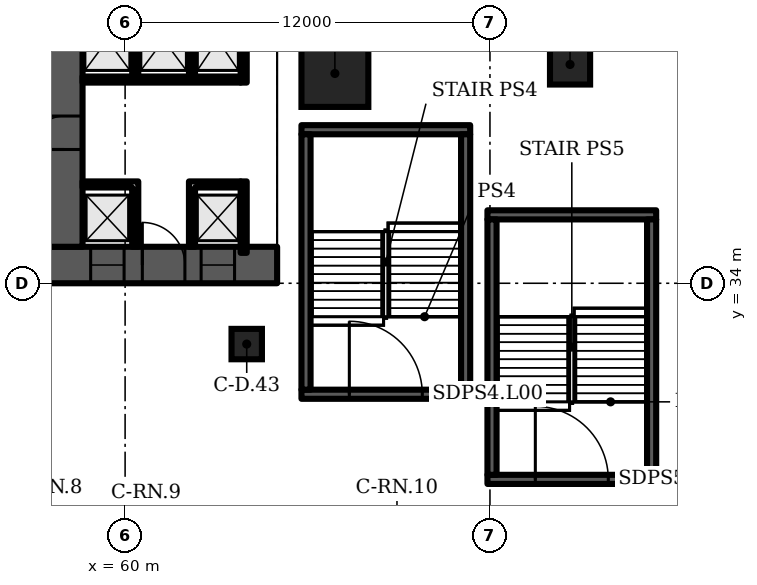
"""IFC4 building model, lengths in metres.
Left out: names, types, materials, properties, quantities, classifications, styles, units other than length and angle.
Written with IfcOpenShell. Run it as: python <this file> out.ifc"""

import sys

from ifc_helpers import new_model, si_unit, direction, frame, frame_2d, origin, origin_2d, place, context, subcontext, project, spatial, polyline, rectangle, outline, extrude, element, fill, save


model = new_model("IFC4")
c1 = context("Model", 3, precision=1e-05, world=origin(), true_north=direction((0.0, 1.0)))
c2 = subcontext(c1, "Body", "Model", "MODEL_VIEW")
j1 = project(units=[si_unit("LENGTHUNIT", "METRE"), si_unit("PLANEANGLEUNIT", "RADIAN")], contexts=[c1])
p1 = place(None, origin())
s1 = spatial("IfcSite", under=j1, at=p1, CompositionType="ELEMENT")
p2 = place(p1, origin())
s2 = spatial("IfcBuilding", under=s1, at=p2, CompositionType="ELEMENT")
p3 = place(p2, origin())
s3 = spatial("IfcBuildingStorey", under=s2, at=p3, CompositionType="ELEMENT", Elevation=0.0)
p4 = place(p3, frame((66.9, 40.9, 0.0), z_axis=(0.0, 0.0, 1.0), x_axis=(1.0, 0.0, 0.0)))
e1 = element("IfcColumn", 1, at=p4, inside=s3, PredefinedType="COLUMN", context=c2, shape_type="SweptSolid", body=[
    extrude(rectangle(XDim=2.2, YDim=2.2, at=origin_2d()), origin(), (0.0, 0.0, 1.0), 8.0),
])
p5 = place(p3, frame((74.634, 41.196, 0.0), z_axis=(0.0, 0.0, 1.0), x_axis=(1.0, 0.0, 0.0)))
e2 = element("IfcColumn", 2, at=p5, inside=s3, PredefinedType="COLUMN", context=c2, shape_type="SweptSolid", body=[
    extrude(rectangle(XDim=1.32, YDim=1.32, at=origin_2d()), origin(), (0.0, 0.0, 1.0), 8.0),
])
p6 = place(p3, frame((64.0, 32.0, 0.0), z_axis=(0.0, 0.0, 1.0), x_axis=(1.0, 0.0, 0.0)))
e3 = element("IfcColumn", 3, at=p6, inside=s3, PredefinedType="COLUMN", context=c2, shape_type="SweptSolid", body=[
    extrude(rectangle(XDim=1.0, YDim=1.0, at=origin_2d()), origin(), (0.0, 0.0, 1.0), 8.0),
])
p7 = place(p3, frame((9.0, 34.6, 0.0), z_axis=(0.0, 0.0, 1.0), x_axis=(1.0, 0.0, 0.0)))
e4 = element("IfcWall", 4, at=p7, inside=s3, PredefinedType="SHEAR", context=c2, shape_type="SweptSolid", body=[
    extrude(rectangle(XDim=56.0, YDim=1.2, at=frame_2d((28.0, 0.0))), origin(), (0.0, 0.0, 1.0), 7.7),
])
p8 = place(p7, frame((3.3, 0.0, 0.0)))
e5 = element("IfcOpeningElement", 5, at=p8, cuts=e4, PredefinedType="OPENING", context=c2, shape_type="SweptSolid", body=[
    extrude(rectangle(XDim=1.0, YDim=2.1, at=frame_2d((0.5, 1.05))), frame((0.0, 0.61, 0.0), z_axis=(0.0, -1.0, 0.0), x_axis=(1.0, 0.0, 0.0)), (0.0, 0.0, 1.0), 1.22),
])
p9 = place(p7, frame((7.867, 0.0, 0.0)))
e6 = element("IfcOpeningElement", 6, at=p9, cuts=e4, PredefinedType="OPENING", context=c2, shape_type="SweptSolid", body=[
    extrude(rectangle(XDim=1.1, YDim=2.1, at=frame_2d((0.55, 1.05))), frame((0.0, 0.61, 0.0), z_axis=(0.0, -1.0, 0.0), x_axis=(1.0, 0.0, 0.0)), (0.0, 0.0, 1.0), 1.22),
])
p10 = place(p7, frame((12.033, 0.0, 0.0)))
e7 = element("IfcOpeningElement", 7, at=p10, cuts=e4, PredefinedType="OPENING", context=c2, shape_type="SweptSolid", body=[
    extrude(rectangle(XDim=1.1, YDim=2.1, at=frame_2d((0.55, 1.05))), frame((0.0, 0.61, 0.0), z_axis=(0.0, -1.0, 0.0), x_axis=(1.0, 0.0, 0.0)), (0.0, 0.0, 1.0), 1.22),
])
p11 = place(p7, frame((9.8, 0.0, 0.0)))
e8 = element("IfcOpeningElement", 8, at=p11, cuts=e4, PredefinedType="OPENING", context=c2, shape_type="SweptSolid", body=[
    extrude(rectangle(XDim=1.4, YDim=2.1, at=frame_2d((0.7, 1.05))), frame((0.0, 0.61, 0.0), z_axis=(0.0, -1.0, 0.0), x_axis=(1.0, 0.0, 0.0)), (0.0, 0.0, 1.0), 1.22),
])
p12 = place(p7, frame((14.65, 0.0, 0.0)))
e9 = element("IfcOpeningElement", 9, at=p12, cuts=e4, PredefinedType="OPENING", context=c2, shape_type="SweptSolid", body=[
    extrude(rectangle(XDim=1.2, YDim=2.1, at=frame_2d((0.6, 1.05))), frame((0.0, 0.61, 0.0), z_axis=(0.0, -1.0, 0.0), x_axis=(1.0, 0.0, 0.0)), (0.0, 0.0, 1.0), 1.22),
])
p13 = place(p7, frame((21.867, 0.0, 0.0)))
e10 = element("IfcOpeningElement", 10, at=p13, cuts=e4, PredefinedType="OPENING", context=c2, shape_type="SweptSolid", body=[
    extrude(rectangle(XDim=1.1, YDim=2.1, at=frame_2d((0.55, 1.05))), frame((0.0, 0.61, 0.0), z_axis=(0.0, -1.0, 0.0), x_axis=(1.0, 0.0, 0.0)), (0.0, 0.0, 1.0), 1.22),
])
p14 = place(p7, frame((26.033, 0.0, 0.0)))
e11 = element("IfcOpeningElement", 11, at=p14, cuts=e4, PredefinedType="OPENING", context=c2, shape_type="SweptSolid", body=[
    extrude(rectangle(XDim=1.1, YDim=2.1, at=frame_2d((0.55, 1.05))), frame((0.0, 0.61, 0.0), z_axis=(0.0, -1.0, 0.0), x_axis=(1.0, 0.0, 0.0)), (0.0, 0.0, 1.0), 1.22),
])
p15 = place(p7, frame((23.8, 0.0, 0.0)))
e12 = element("IfcOpeningElement", 12, at=p15, cuts=e4, PredefinedType="OPENING", context=c2, shape_type="SweptSolid", body=[
    extrude(rectangle(XDim=1.4, YDim=2.1, at=frame_2d((0.7, 1.05))), frame((0.0, 0.61, 0.0), z_axis=(0.0, -1.0, 0.0), x_axis=(1.0, 0.0, 0.0)), (0.0, 0.0, 1.0), 1.22),
])
p16 = place(p7, frame((28.867, 0.0, 0.0)))
e13 = element("IfcOpeningElement", 13, at=p16, cuts=e4, PredefinedType="OPENING", context=c2, shape_type="SweptSolid", body=[
    extrude(rectangle(XDim=1.1, YDim=2.1, at=frame_2d((0.55, 1.05))), frame((0.0, 0.61, 0.0), z_axis=(0.0, -1.0, 0.0), x_axis=(1.0, 0.0, 0.0)), (0.0, 0.0, 1.0), 1.22),
])
p17 = place(p7, frame((33.033, 0.0, 0.0)))
e14 = element("IfcOpeningElement", 14, at=p17, cuts=e4, PredefinedType="OPENING", context=c2, shape_type="SweptSolid", body=[
    extrude(rectangle(XDim=1.1, YDim=2.1, at=frame_2d((0.55, 1.05))), frame((0.0, 0.61, 0.0), z_axis=(0.0, -1.0, 0.0), x_axis=(1.0, 0.0, 0.0)), (0.0, 0.0, 1.0), 1.22),
])
p18 = place(p7, frame((40.15, 0.0, 0.0)))
e15 = element("IfcOpeningElement", 15, at=p18, cuts=e4, PredefinedType="OPENING", context=c2, shape_type="SweptSolid", body=[
    extrude(rectangle(XDim=1.2, YDim=2.1, at=frame_2d((0.6, 1.05))), frame((0.0, 0.61, 0.0), z_axis=(0.0, -1.0, 0.0), x_axis=(1.0, 0.0, 0.0)), (0.0, 0.0, 1.0), 1.22),
])
p19 = place(p7, frame((42.867, 0.0, 0.0)))
e16 = element("IfcOpeningElement", 16, at=p19, cuts=e4, PredefinedType="OPENING", context=c2, shape_type="SweptSolid", body=[
    extrude(rectangle(XDim=1.1, YDim=2.1, at=frame_2d((0.55, 1.05))), frame((0.0, 0.61, 0.0), z_axis=(0.0, -1.0, 0.0), x_axis=(1.0, 0.0, 0.0)), (0.0, 0.0, 1.0), 1.22),
])
p20 = place(p7, frame((47.033, 0.0, 0.0)))
e17 = element("IfcOpeningElement", 17, at=p20, cuts=e4, PredefinedType="OPENING", context=c2, shape_type="SweptSolid", body=[
    extrude(rectangle(XDim=1.1, YDim=2.1, at=frame_2d((0.55, 1.05))), frame((0.0, 0.61, 0.0), z_axis=(0.0, -1.0, 0.0), x_axis=(1.0, 0.0, 0.0)), (0.0, 0.0, 1.0), 1.22),
])
p21 = place(p7, frame((44.8, 0.0, 0.0)))
e18 = element("IfcOpeningElement", 18, at=p21, cuts=e4, PredefinedType="OPENING", context=c2, shape_type="SweptSolid", body=[
    extrude(rectangle(XDim=1.4, YDim=2.1, at=frame_2d((0.7, 1.05))), frame((0.0, 0.61, 0.0), z_axis=(0.0, -1.0, 0.0), x_axis=(1.0, 0.0, 0.0)), (0.0, 0.0, 1.0), 1.22),
])
p22 = place(p7, frame((49.867, 0.0, 0.0)))
e19 = element("IfcOpeningElement", 19, at=p22, cuts=e4, PredefinedType="OPENING", context=c2, shape_type="SweptSolid", body=[
    extrude(rectangle(XDim=1.1, YDim=2.1, at=frame_2d((0.55, 1.05))), frame((0.0, 0.61, 0.0), z_axis=(0.0, -1.0, 0.0), x_axis=(1.0, 0.0, 0.0)), (0.0, 0.0, 1.0), 1.22),
])
p23 = place(p7, frame((53.5, 0.0, 0.0)))
e20 = element("IfcOpeningElement", 20, at=p23, cuts=e4, PredefinedType="OPENING", context=c2, shape_type="SweptSolid", body=[
    extrude(rectangle(XDim=1.1, YDim=2.1, at=frame_2d((0.55, 1.05))), frame((0.0, 0.61, 0.0), z_axis=(0.0, -1.0, 0.0), x_axis=(1.0, 0.0, 0.0)), (0.0, 0.0, 1.0), 1.22),
])
p24 = place(p7, frame((51.567, 0.0, 0.0)))
e21 = element("IfcOpeningElement", 21, at=p24, cuts=e4, PredefinedType="OPENING", context=c2, shape_type="SweptSolid", body=[
    extrude(rectangle(XDim=1.4, YDim=2.1, at=frame_2d((0.7, 1.05))), frame((0.0, 0.61, 0.0), z_axis=(0.0, -1.0, 0.0), x_axis=(1.0, 0.0, 0.0)), (0.0, 0.0, 1.0), 1.22),
])
p25 = place(p3, frame((58.0, 35.2, 0.0), z_axis=(0.0, 0.0, 1.0), x_axis=(0.0, 1.0, 0.0)))
e22 = element("IfcWall", 22, at=p25, inside=s3, PredefinedType="SHEAR", context=c2, shape_type="SweptSolid", body=[
    extrude(rectangle(XDim=12.8, YDim=1.2, at=frame_2d((6.4, 0.0))), origin(), (0.0, 0.0, 1.0), 7.7),
])
p26 = place(p25, frame((10.134, 0.0, 0.0)))
e23 = element("IfcOpeningElement", 23, at=p26, cuts=e22, PredefinedType="OPENING", context=c2, shape_type="SweptSolid", body=[
    extrude(rectangle(XDim=1.0, YDim=2.1, at=frame_2d((0.5, 1.05))), frame((0.0, 0.61, 0.0), z_axis=(0.0, -1.0, 0.0), x_axis=(1.0, 0.0, 0.0)), (0.0, 0.0, 1.0), 1.22),
])
p27 = place(p25, frame((3.2, 0.0, 0.0)))
e24 = element("IfcOpeningElement", 24, at=p27, cuts=e22, PredefinedType="OPENING", context=c2, shape_type="SweptSolid", body=[
    extrude(rectangle(XDim=1.1, YDim=2.1, at=frame_2d((0.55, 1.05))), frame((0.0, 0.61, 0.0), z_axis=(0.0, -1.0, 0.0), x_axis=(1.0, 0.0, 0.0)), (0.0, 0.0, 1.0), 1.22),
])
p28 = place(p3, frame((58.6, 40.7, 0.0), z_axis=(0.0, 0.0, 1.0), x_axis=(1.0, 0.0, 0.0)))
e25 = element("IfcWall", 25, at=p28, inside=s3, PredefinedType="PARTITIONING", context=c2, shape_type="SweptSolid", body=[
    extrude(rectangle(XDim=5.2, YDim=0.2, at=frame_2d((2.6, 0.0))), origin(), (0.0, 0.0, 1.0), 7.7),
])
p29 = place(p28, frame((0.267, 0.0, 0.0)))
e26 = element("IfcOpeningElement", 26, at=p29, cuts=e25, PredefinedType="OPENING", context=c2, shape_type="SweptSolid", body=[
    extrude(rectangle(XDim=1.1, YDim=2.1, at=frame_2d((0.55, 1.05))), frame((0.0, 0.11, 0.0), z_axis=(0.0, -1.0, 0.0), x_axis=(1.0, 0.0, 0.0)), (0.0, 0.0, 1.0), 0.22),
])
p30 = place(p28, frame((2.117, 0.0, 0.0)))
e27 = element("IfcOpeningElement", 27, at=p30, cuts=e25, PredefinedType="OPENING", context=c2, shape_type="SweptSolid", body=[
    extrude(rectangle(XDim=1.1, YDim=2.1, at=frame_2d((0.55, 1.05))), frame((0.0, 0.11, 0.0), z_axis=(0.0, -1.0, 0.0), x_axis=(1.0, 0.0, 0.0)), (0.0, 0.0, 1.0), 0.22),
])
p31 = place(p28, frame((3.9, 0.0, 0.0)))
e28 = element("IfcOpeningElement", 28, at=p31, cuts=e25, PredefinedType="OPENING", context=c2, shape_type="SweptSolid", body=[
    extrude(rectangle(XDim=1.1, YDim=2.1, at=frame_2d((0.55, 1.05))), frame((0.0, 0.11, 0.0), z_axis=(0.0, -1.0, 0.0), x_axis=(1.0, 0.0, 0.0)), (0.0, 0.0, 1.0), 0.22),
])
p32 = place(p3, frame((0.0, 0.0, -0.0)))
e29 = element("IfcWall", 29, at=p32, inside=s3, PredefinedType="PARTITIONING", context=c2, shape_type="SweptSolid", body=[
    extrude(outline(polyline([(60.233, 37.15), (58.6, 37.15), (58.6, 37.35), (60.233, 37.35), (60.433, 37.35), (60.433, 35.2), (60.233, 35.2), (60.233, 37.15)])), origin(), (0.0, 0.0, 1.0), 7.7),
])
p33 = place(p3, frame((0.0, 0.0, -0.0)))
e30 = element("IfcWall", 30, at=p33, inside=s3, PredefinedType="PARTITIONING", context=c2, shape_type="SweptSolid", body=[
    extrude(outline(polyline([(62.1, 37.35), (62.3, 37.35), (63.8, 37.35), (63.8, 37.15), (62.3, 37.15), (62.3, 35.2), (62.1, 35.2), (62.1, 37.35)])), origin(), (0.0, 0.0, 1.0), 7.7),
])
p34 = place(p3, frame((0.0, 0.0, -0.0)))
e31 = element("IfcWall", 31, at=p34, inside=s3, PredefinedType="PARTITIONING", context=c2, shape_type="SweptSolid", body=[
    extrude(outline(polyline([(60.433, 40.8), (60.233, 40.8), (60.233, 43.8), (58.6, 43.8), (58.6, 44.0), (63.8, 44.0), (63.8, 43.8), (62.3, 43.8), (62.3, 40.8), (62.1, 40.8), (62.1, 43.8), (60.433, 43.8), (60.433, 40.8)])), origin(), (0.0, 0.0, 1.0), 7.7),
])
p35 = place(p3, frame((63.9, 35.0, 0.0), z_axis=(0.0, 0.0, 1.0), x_axis=(0.0, 1.0, 0.0)))
e32 = element("IfcWall", 32, at=p35, inside=s3, PredefinedType="PARTITIONING", context=c2, shape_type="SweptSolid", body=[
    extrude(rectangle(XDim=2.35, YDim=0.2, at=frame_2d((1.175, 0.0))), origin(), (0.0, 0.0, 1.0), 7.7),
])
p36 = place(p3, frame((63.9, 40.6, 0.0), z_axis=(0.0, 0.0, 1.0), x_axis=(0.0, 1.0, 0.0)))
e33 = element("IfcWall", 33, at=p36, inside=s3, PredefinedType="PARTITIONING", context=c2, shape_type="SweptSolid", body=[
    extrude(rectangle(XDim=3.4, YDim=0.2, at=frame_2d((1.7, 0.0))), origin(), (0.0, 0.0, 1.0), 7.7),
])
p37 = place(p3, frame((65.8, 30.35, 0.0), z_axis=(0.0, 0.0, 1.0), x_axis=(1.0, 0.0, 0.0)))
e34 = element("IfcWall", 34, at=p37, inside=s3, PredefinedType="SHEAR", context=c2, shape_type="SweptSolid", body=[
    extrude(rectangle(XDim=5.55, YDim=0.3, at=frame_2d((2.775, 0.0))), origin(), (0.0, 0.0, 1.0), 7.7),
])
p38 = place(p37, frame((1.575, 0.0, 0.0)))
e35 = element("IfcOpeningElement", 35, at=p38, cuts=e34, PredefinedType="OPENING", context=c2, shape_type="SweptSolid", body=[
    extrude(rectangle(XDim=2.4, YDim=2.1, at=frame_2d((1.2, 1.05))), frame((0.0, 0.16, 0.0), z_axis=(0.0, -1.0, 0.0), x_axis=(1.0, 0.0, 0.0)), (0.0, 0.0, 1.0), 0.32),
])
p39 = place(p3, frame((65.8, 39.05, 0.0), z_axis=(0.0, 0.0, 1.0), x_axis=(1.0, 0.0, 0.0)))
e36 = element("IfcWall", 36, at=p39, inside=s3, PredefinedType="SHEAR", context=c2, shape_type="SweptSolid", body=[
    extrude(rectangle(XDim=5.55, YDim=0.3, at=frame_2d((2.775, 0.0))), origin(), (0.0, 0.0, 1.0), 7.7),
])
for number, where, z_axis, x_axis in (
    (37, (65.95, 30.5, 0.0), (0.0, 0.0, 1.0), (0.0, 1.0, 0.0)),
    (38, (71.2, 30.5, 0.0), (0.0, 0.0, 1.0), (0.0, 1.0, 0.0)),
):
    element("IfcWall", number, at=place(p3, frame(where, z_axis=z_axis, x_axis=x_axis)), inside=s3, PredefinedType="SHEAR", context=c2, shape_type="SweptSolid", body=[
        extrude(rectangle(XDim=8.4, YDim=0.3, at=frame_2d((4.2, 0.0))), origin(), (0.0, 0.0, 1.0), 7.7),
    ])
p40 = place(p3, frame((71.917, 27.55, 0.0), z_axis=(0.0, 0.0, 1.0), x_axis=(1.0, 0.0, 0.0)))
e39 = element("IfcWall", 39, at=p40, inside=s3, PredefinedType="SHEAR", context=c2, shape_type="SweptSolid", body=[
    extrude(rectangle(XDim=5.55, YDim=0.3, at=frame_2d((2.775, 0.0))), origin(), (0.0, 0.0, 1.0), 7.7),
])
p41 = place(p40, frame((1.575, 0.0, 0.0)))
e40 = element("IfcOpeningElement", 40, at=p41, cuts=e39, PredefinedType="OPENING", context=c2, shape_type="SweptSolid", body=[
    extrude(rectangle(XDim=2.4, YDim=2.1, at=frame_2d((1.2, 1.05))), frame((0.0, 0.16, 0.0), z_axis=(0.0, -1.0, 0.0), x_axis=(1.0, 0.0, 0.0)), (0.0, 0.0, 1.0), 0.32),
])
p42 = place(p3, frame((71.917, 36.25, 0.0), z_axis=(0.0, 0.0, 1.0), x_axis=(1.0, 0.0, 0.0)))
e41 = element("IfcWall", 41, at=p42, inside=s3, PredefinedType="SHEAR", context=c2, shape_type="SweptSolid", body=[
    extrude(rectangle(XDim=5.55, YDim=0.3, at=frame_2d((2.775, 0.0))), origin(), (0.0, 0.0, 1.0), 7.7),
])
for number, where, z_axis, x_axis in (
    (42, (72.067, 27.7, 0.0), (0.0, 0.0, 1.0), (0.0, 1.0, 0.0)),
    (43, (77.317, 27.7, 0.0), (0.0, 0.0, 1.0), (0.0, 1.0, 0.0)),
):
    element("IfcWall", number, at=place(p3, frame(where, z_axis=z_axis, x_axis=x_axis)), inside=s3, PredefinedType="SHEAR", context=c2, shape_type="SweptSolid", body=[
        extrude(rectangle(XDim=8.4, YDim=0.3, at=frame_2d((4.2, 0.0))), origin(), (0.0, 0.0, 1.0), 7.7),
    ])
p43 = place(p22, origin())
e44 = element("IfcDoor", 44, at=p43, inside=s3, OperationType="DOUBLE_DOOR_SLIDING", PredefinedType="DOOR", context=c2, shape_type="SweptSolid", body=[
    extrude(rectangle(XDim=1.1, YDim=2.1, at=frame_2d((0.55, 1.05))), frame((0.0, 0.025, 0.0), z_axis=(0.0, -1.0, 0.0), x_axis=(1.0, 0.0, 0.0)), (0.0, 0.0, 1.0), 0.05),
])
fill(e19, e44)
p44 = place(p23, origin())
e45 = element("IfcDoor", 45, at=p44, inside=s3, OperationType="DOUBLE_DOOR_SLIDING", PredefinedType="DOOR", context=c2, shape_type="SweptSolid", body=[
    extrude(rectangle(XDim=1.1, YDim=2.1, at=frame_2d((0.55, 1.05))), frame((0.0, 0.025, 0.0), z_axis=(0.0, -1.0, 0.0), x_axis=(1.0, 0.0, 0.0)), (0.0, 0.0, 1.0), 0.05),
])
fill(e20, e45)
p45 = place(p24, origin())
e46 = element("IfcDoor", 46, at=p45, inside=s3, OperationType="DOUBLE_DOOR_SINGLE_SWING", PredefinedType="DOOR", context=c2, shape_type="SweptSolid", body=[
    extrude(rectangle(XDim=1.4, YDim=2.1, at=frame_2d((0.7, 1.05))), frame((0.0, 0.025, 0.0), z_axis=(0.0, -1.0, 0.0), x_axis=(1.0, 0.0, 0.0)), (0.0, 0.0, 1.0), 0.05),
])
fill(e21, e46)
p46 = place(p29, origin())
e47 = element("IfcDoor", 47, at=p46, inside=s3, OperationType="DOUBLE_DOOR_SLIDING", PredefinedType="DOOR", context=c2, shape_type="SweptSolid", body=[
    extrude(rectangle(XDim=1.1, YDim=2.1, at=frame_2d((0.55, 1.05))), frame((0.0, 0.025, 0.0), z_axis=(0.0, -1.0, 0.0), x_axis=(1.0, 0.0, 0.0)), (0.0, 0.0, 1.0), 0.05),
])
fill(e26, e47)
p47 = place(p30, origin())
e48 = element("IfcDoor", 48, at=p47, inside=s3, OperationType="DOUBLE_DOOR_SLIDING", PredefinedType="DOOR", context=c2, shape_type="SweptSolid", body=[
    extrude(rectangle(XDim=1.1, YDim=2.1, at=frame_2d((0.55, 1.05))), frame((0.0, 0.025, 0.0), z_axis=(0.0, -1.0, 0.0), x_axis=(1.0, 0.0, 0.0)), (0.0, 0.0, 1.0), 0.05),
])
fill(e27, e48)
p48 = place(p31, origin())
e49 = element("IfcDoor", 49, at=p48, inside=s3, OperationType="DOUBLE_DOOR_SLIDING", PredefinedType="DOOR", context=c2, shape_type="SweptSolid", body=[
    extrude(rectangle(XDim=1.1, YDim=2.1, at=frame_2d((0.55, 1.05))), frame((0.0, 0.025, 0.0), z_axis=(0.0, -1.0, 0.0), x_axis=(1.0, 0.0, 0.0)), (0.0, 0.0, 1.0), 0.05),
])
fill(e28, e49)
p49 = place(p27, origin())
e50 = element("IfcDoor", 50, at=p49, inside=s3, OperationType="SINGLE_SWING_LEFT", PredefinedType="DOOR", context=c2, shape_type="SweptSolid", body=[
    extrude(rectangle(XDim=1.1, YDim=2.1, at=frame_2d((0.55, 1.05))), frame((0.0, 0.025, 0.0), z_axis=(0.0, -1.0, 0.0), x_axis=(1.0, 0.0, 0.0)), (0.0, 0.0, 1.0), 0.05),
])
fill(e24, e50)
p50 = place(p38, origin())
e51 = element("IfcDoor", 51, at=p50, inside=s3, OperationType="DOUBLE_DOOR_SINGLE_SWING", PredefinedType="DOOR", context=c2, shape_type="SweptSolid", body=[
    extrude(rectangle(XDim=2.4, YDim=2.1, at=frame_2d((1.2, 1.05))), frame((0.0, 0.025, 0.0), z_axis=(0.0, -1.0, 0.0), x_axis=(1.0, 0.0, 0.0)), (0.0, 0.0, 1.0), 0.05),
])
fill(e35, e51)
p51 = place(p41, origin())
e52 = element("IfcDoor", 52, at=p51, inside=s3, OperationType="DOUBLE_DOOR_SINGLE_SWING", PredefinedType="DOOR", context=c2, shape_type="SweptSolid", body=[
    extrude(rectangle(XDim=2.4, YDim=2.1, at=frame_2d((1.2, 1.05))), frame((0.0, 0.025, 0.0), z_axis=(0.0, -1.0, 0.0), x_axis=(1.0, 0.0, 0.0)), (0.0, 0.0, 1.0), 0.05),
])
fill(e40, e52)
save(model, sys.argv[1])
